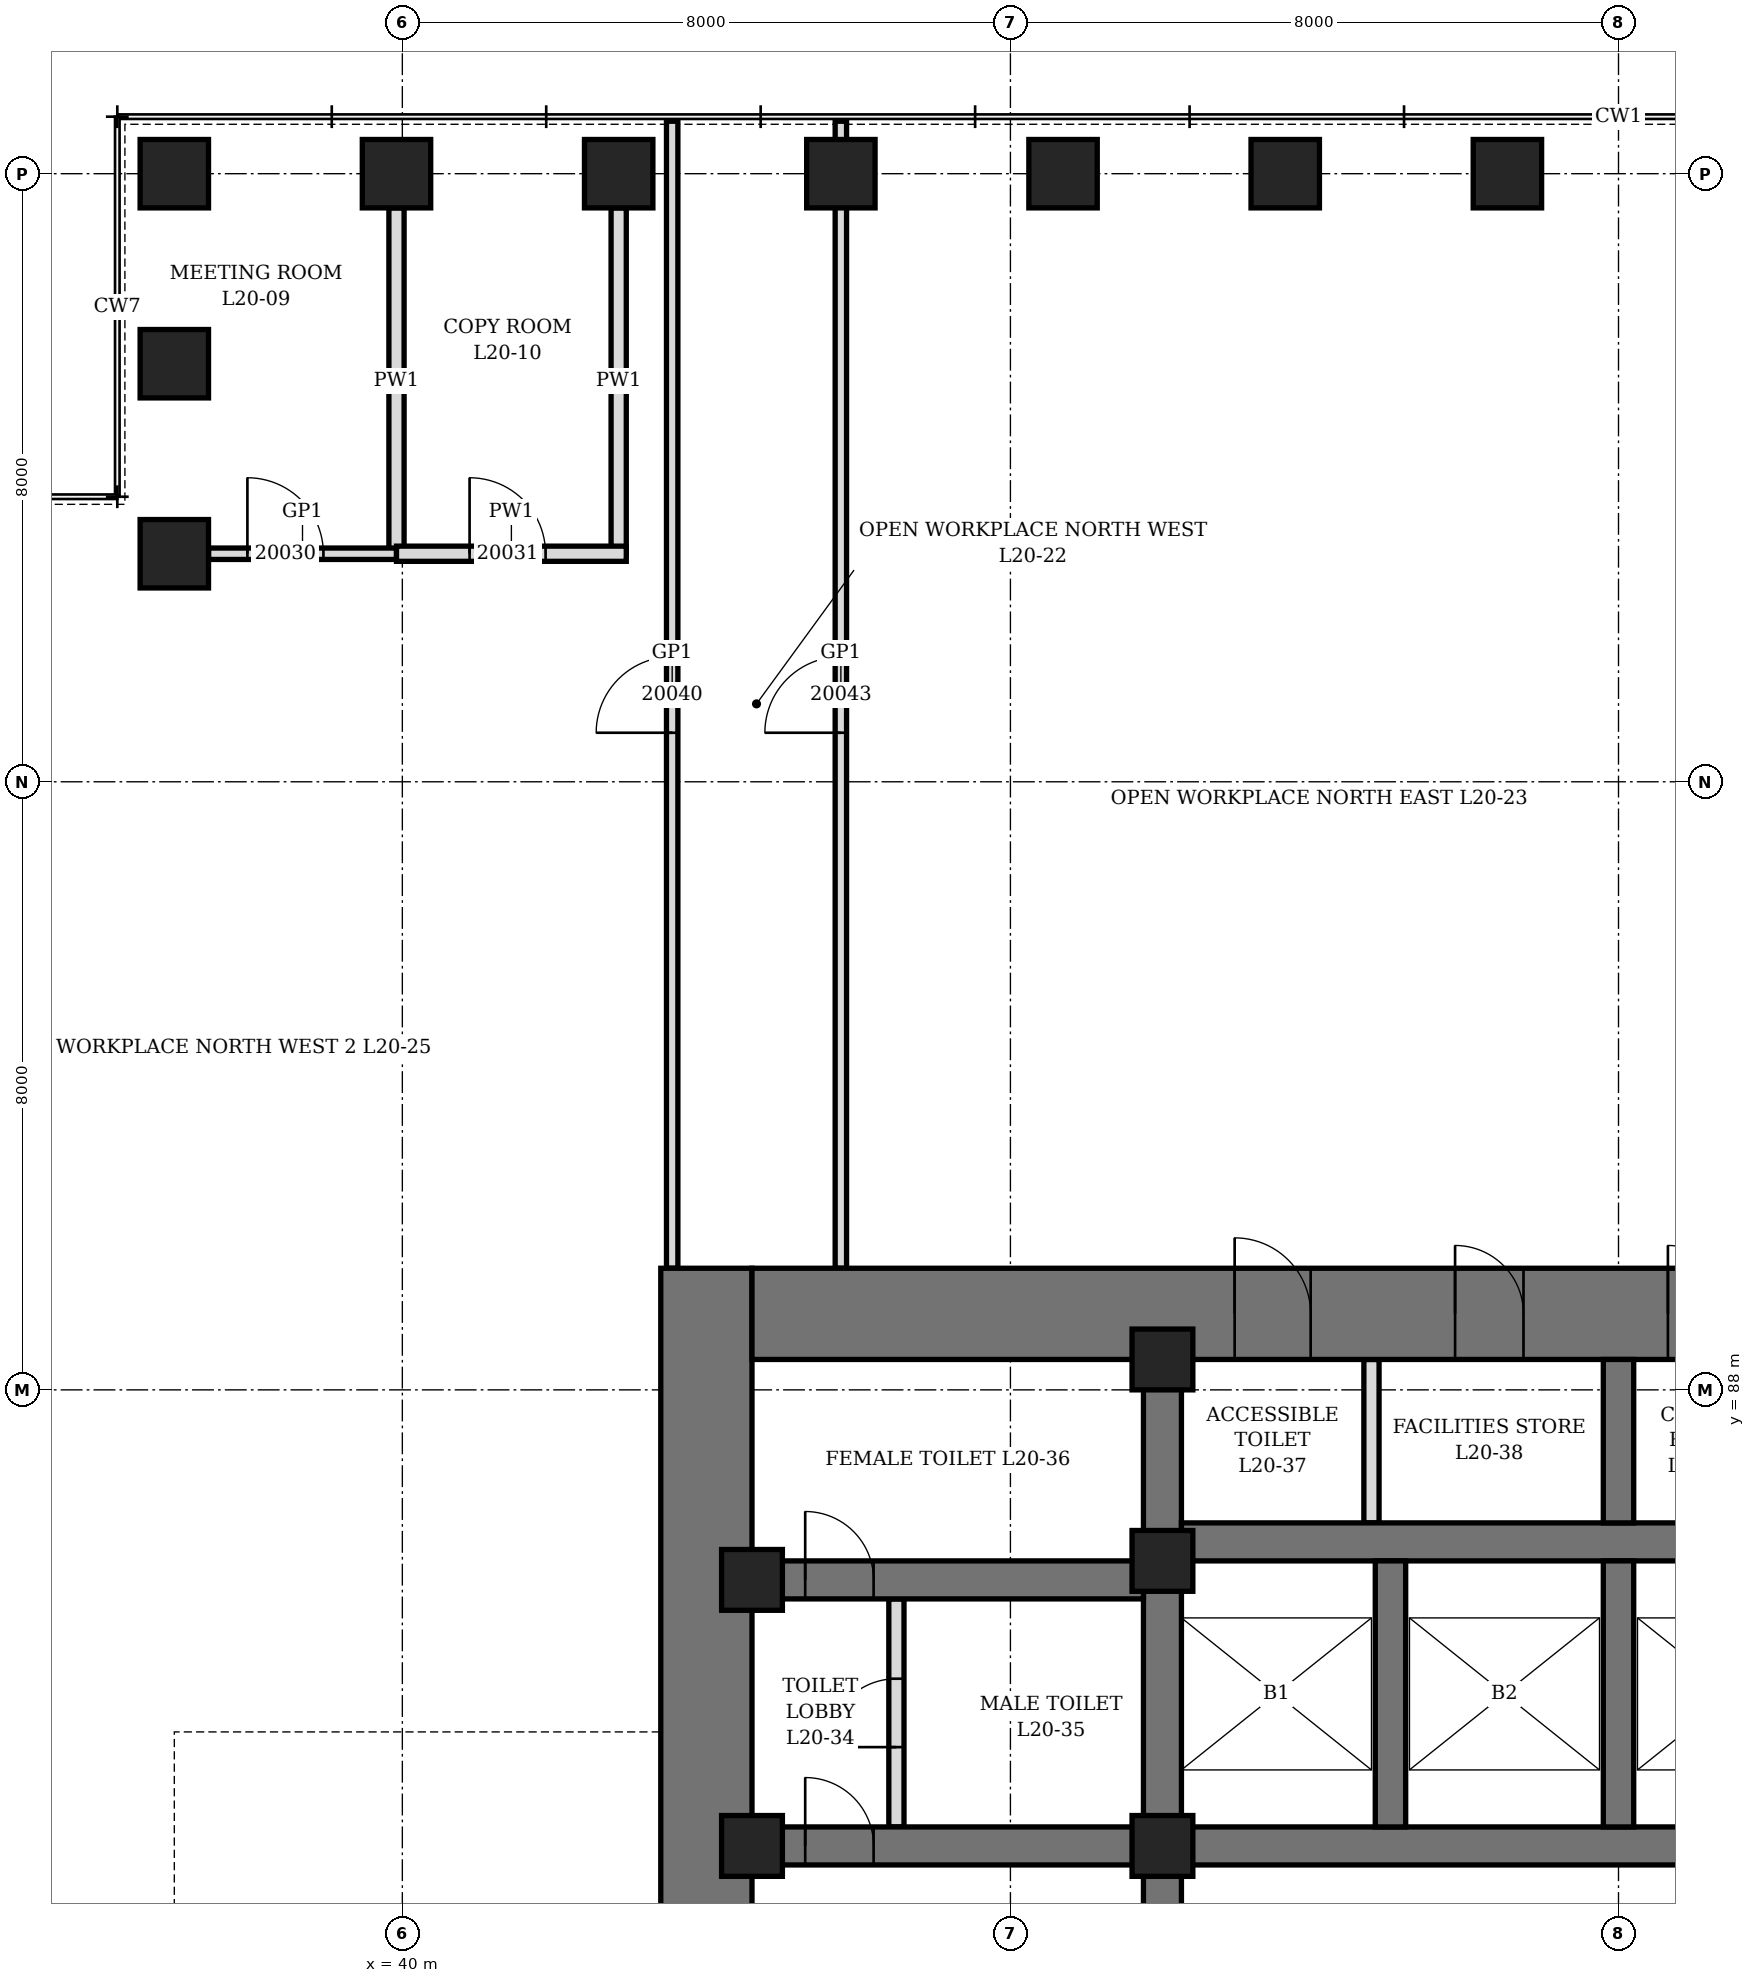
"""IFC4 building model, lengths in metres.
Left out: names, types, materials, properties, quantities, classifications, styles, units other than length and angle.
Written with IfcOpenShell. Run it as: python <this file> out.ifc"""

import sys

from ifc_helpers import new_model, si_unit, direction, frame, frame_2d, origin, origin_2d, place, context, subcontext, project, spatial, rectangle, hollow_rectangle, extrude, element, fill, save


model = new_model("IFC4")
c1 = context("Model", 3, precision=1e-05, world=origin(), true_north=direction((0.0, 1.0)))
c2 = subcontext(c1, "Body", "Model", "MODEL_VIEW")
j1 = project(units=[si_unit("LENGTHUNIT", "METRE"), si_unit("PLANEANGLEUNIT", "RADIAN")], contexts=[c1])
p1 = place(None, origin())
s1 = spatial("IfcSite", under=j1, at=p1, CompositionType="ELEMENT")
p2 = place(p1, origin())
s2 = spatial("IfcBuilding", under=s1, at=p2, CompositionType="ELEMENT")
p3 = place(p2, frame((0.0, 0.0, 93.7)))
s3 = spatial("IfcBuildingStorey", under=s2, at=p3, CompositionType="ELEMENT", Elevation=93.7)
for number, where, z_axis, x_axis in (
    (1, (54.539, 104.0, 0.0), (0.0, 0.0, 1.0), (1.0, 0.0, 0.0)),
    (2, (51.615, 104.0, 0.0), (0.0, 0.0, 1.0), (1.0, 0.0, 0.0)),
    (3, (48.692, 104.0, 0.0), (0.0, 0.0, 1.0), (1.0, 0.0, 0.0)),
    (4, (45.769, 104.0, 0.0), (0.0, 0.0, 1.0), (1.0, 0.0, 0.0)),
    (5, (42.846, 104.0, 0.0), (0.0, 0.0, 1.0), (1.0, 0.0, 0.0)),
    (6, (39.923, 104.0, 0.0), (0.0, 0.0, 1.0), (1.0, 0.0, 0.0)),
    (7, (37.0, 104.0, 0.0), (0.0, 0.0, 1.0), (0.0, 1.0, 0.0)),
    (8, (37.0, 101.5, 0.0), (0.0, 0.0, 1.0), (0.0, 1.0, 0.0)),
    (9, (37.0, 99.0, 0.0), (0.0, 0.0, 1.0), (1.0, 0.0, 0.0)),
):
    element("IfcColumn", number, at=place(p3, frame(where, z_axis=z_axis, x_axis=x_axis)), inside=s3, PredefinedType="COLUMN", context=c2, shape_type="SweptSolid", body=[
        extrude(hollow_rectangle(XDim=0.9, YDim=0.9, WallThickness=0.12, at=origin_2d()), origin(), (0.0, 0.0, 1.0), 4.2),
    ])
p4 = place(p3, frame((44.0, 70.4, 0.0), z_axis=(0.0, 0.0, 1.0), x_axis=(0.0, 1.0, 0.0)))
e10 = element("IfcWall", 10, at=p4, inside=s3, PredefinedType="SHEAR", context=c2, shape_type="SweptSolid", body=[
    extrude(rectangle(XDim=19.2, YDim=1.2, at=frame_2d((9.6, 0.0))), origin(), (0.0, 0.0, 1.0), 4.2),
])
p5 = place(p4, frame((8.6, 0.0, 0.0)))
e11 = element("IfcOpeningElement", 11, at=p5, cuts=e10, PredefinedType="OPENING", context=c2, shape_type="SweptSolid", body=[
    extrude(rectangle(XDim=2.0, YDim=2.4, at=frame_2d((1.0, 1.2))), frame((0.0, 0.61, 0.0), z_axis=(0.0, -1.0, 0.0), x_axis=(1.0, 0.0, 0.0)), (0.0, 0.0, 1.0), 1.22),
])
p6 = place(p3, frame((44.6, 89.0, 0.0), z_axis=(0.0, 0.0, 1.0), x_axis=(1.0, 0.0, 0.0)))
e12 = element("IfcWall", 12, at=p6, inside=s3, PredefinedType="SHEAR", context=c2, shape_type="SweptSolid", body=[
    extrude(rectangle(XDim=22.8, YDim=1.2, at=frame_2d((11.4, 0.0))), origin(), (0.0, 0.0, 1.0), 4.2),
])
p7 = place(p6, frame((6.35, 0.0, 0.0)))
e13 = element("IfcOpeningElement", 13, at=p7, cuts=e12, PredefinedType="OPENING", context=c2, shape_type="SweptSolid", body=[
    extrude(rectangle(XDim=1.0, YDim=2.1, at=frame_2d((0.5, 1.05))), frame((0.0, 0.61, 0.0), z_axis=(0.0, -1.0, 0.0), x_axis=(1.0, 0.0, 0.0)), (0.0, 0.0, 1.0), 1.22),
])
p8 = place(p6, frame((9.25, 0.0, 0.0)))
e14 = element("IfcOpeningElement", 14, at=p8, cuts=e12, PredefinedType="OPENING", context=c2, shape_type="SweptSolid", body=[
    extrude(rectangle(XDim=0.9, YDim=2.1, at=frame_2d((0.45, 1.05))), frame((0.0, 0.61, 0.0), z_axis=(0.0, -1.0, 0.0), x_axis=(1.0, 0.0, 0.0)), (0.0, 0.0, 1.0), 1.22),
])
p9 = place(p6, frame((12.05, 0.0, 0.0)))
e15 = element("IfcOpeningElement", 15, at=p9, cuts=e12, PredefinedType="OPENING", context=c2, shape_type="SweptSolid", body=[
    extrude(rectangle(XDim=0.9, YDim=2.1, at=frame_2d((0.45, 1.05))), frame((0.0, 0.61, 0.0), z_axis=(0.0, -1.0, 0.0), x_axis=(1.0, 0.0, 0.0)), (0.0, 0.0, 1.0), 1.22),
])
p10 = place(p6, frame((13.975, 0.0, 0.0)))
e16 = element("IfcOpeningElement", 16, at=p10, cuts=e12, PredefinedType="OPENING", context=c2, shape_type="SweptSolid", body=[
    extrude(rectangle(XDim=0.9, YDim=2.1, at=frame_2d((0.45, 1.05))), frame((0.0, 0.61, 0.0), z_axis=(0.0, -1.0, 0.0), x_axis=(1.0, 0.0, 0.0)), (0.0, 0.0, 1.0), 1.22),
])
p11 = place(p3, frame((50.0, 71.6, 0.0), z_axis=(0.0, 0.0, 1.0), x_axis=(0.0, 1.0, 0.0)))
e17 = element("IfcWall", 17, at=p11, inside=s3, PredefinedType="SHEAR", context=c2, shape_type="SweptSolid", body=[
    extrude(rectangle(XDim=16.8, YDim=0.5, at=frame_2d((8.4, 0.0))), origin(), (0.0, 0.0, 1.0), 4.2),
])
p12 = place(p11, frame((7.5, 0.0, 0.0)))
e18 = element("IfcOpeningElement", 18, at=p12, cuts=e17, PredefinedType="OPENING", context=c2, shape_type="SweptSolid", body=[
    extrude(rectangle(XDim=1.8, YDim=2.4, at=frame_2d((0.9, 1.2))), frame((0.0, 0.26, 0.0), z_axis=(0.0, -1.0, 0.0), x_axis=(1.0, 0.0, 0.0)), (0.0, 0.0, 1.0), 0.52),
])
p13 = place(p3, frame((44.6, 82.0, 0.0), z_axis=(0.0, 0.0, 1.0), x_axis=(1.0, 0.0, 0.0)))
e19 = element("IfcWall", 19, at=p13, inside=s3, PredefinedType="SHEAR", context=c2, shape_type="SweptSolid", body=[
    extrude(rectangle(XDim=5.15, YDim=0.5, at=frame_2d((2.575, 0.0))), origin(), (0.0, 0.0, 1.0), 4.2),
])
p14 = place(p13, frame((0.7, 0.0, 0.0)))
e20 = element("IfcOpeningElement", 20, at=p14, cuts=e19, PredefinedType="OPENING", context=c2, shape_type="SweptSolid", body=[
    extrude(rectangle(XDim=0.9, YDim=2.1, at=frame_2d((0.45, 1.05))), frame((0.0, 0.26, 0.0), z_axis=(0.0, -1.0, 0.0), x_axis=(1.0, 0.0, 0.0)), (0.0, 0.0, 1.0), 0.52),
])
p15 = place(p3, frame((44.6, 85.5, 0.0), z_axis=(0.0, 0.0, 1.0), x_axis=(1.0, 0.0, 0.0)))
e21 = element("IfcWall", 21, at=p15, inside=s3, PredefinedType="SHEAR", context=c2, shape_type="SweptSolid", body=[
    extrude(rectangle(XDim=5.15, YDim=0.5, at=frame_2d((2.575, 0.0))), origin(), (0.0, 0.0, 1.0), 4.2),
])
p16 = place(p15, frame((0.7, 0.0, 0.0)))
e22 = element("IfcOpeningElement", 22, at=p16, cuts=e21, PredefinedType="OPENING", context=c2, shape_type="SweptSolid", body=[
    extrude(rectangle(XDim=0.9, YDim=2.1, at=frame_2d((0.45, 1.05))), frame((0.0, 0.26, 0.0), z_axis=(0.0, -1.0, 0.0), x_axis=(1.0, 0.0, 0.0)), (0.0, 0.0, 1.0), 0.52),
])
for number, where, z_axis, x_axis in (
    (23, (50.25, 82.0, 0.0), (0.0, 0.0, 1.0), (1.0, 0.0, 0.0)),
    (24, (50.25, 86.0, 0.0), (0.0, 0.0, 1.0), (1.0, 0.0, 0.0)),
):
    element("IfcWall", number, at=place(p3, frame(where, z_axis=z_axis, x_axis=x_axis)), inside=s3, PredefinedType="SHEAR", context=c2, shape_type="SweptSolid", body=[
        extrude(rectangle(XDim=11.5, YDim=0.5, at=frame_2d((5.75, 0.0))), origin(), (0.0, 0.0, 1.0), 4.2),
    ])
for number, where, z_axis, x_axis in (
    (25, (53.0, 82.25, 0.0), (0.0, 0.0, 1.0), (0.0, 1.0, 0.0)),
    (26, (56.0, 82.25, 0.0), (0.0, 0.0, 1.0), (0.0, 1.0, 0.0)),
):
    element("IfcWall", number, at=place(p3, frame(where, z_axis=z_axis, x_axis=x_axis)), inside=s3, PredefinedType="SHEAR", context=c2, shape_type="SweptSolid", body=[
        extrude(rectangle(XDim=3.5, YDim=0.4, at=frame_2d((1.75, 0.0))), origin(), (0.0, 0.0, 1.0), 4.2),
    ])
p17 = place(p3, frame((56.0, 86.25, 0.0), z_axis=(0.0, 0.0, 1.0), x_axis=(0.0, 1.0, 0.0)))
e27 = element("IfcWall", 27, at=p17, inside=s3, PredefinedType="SHEAR", context=c2, shape_type="SweptSolid", body=[
    extrude(rectangle(XDim=2.15, YDim=0.4, at=frame_2d((1.075, 0.0))), origin(), (0.0, 0.0, 1.0), 4.2),
])
for number, where, z_axis, x_axis in (
    (28, (44.6, 82.0, 0.0), (0.0, 0.0, 1.0), (1.0, 0.0, 0.0)),
    (29, (44.6, 85.5, 0.0), (0.0, 0.0, 1.0), (1.0, 0.0, 0.0)),
    (30, (50.0, 82.0, 0.0), (0.0, 0.0, 1.0), (1.0, 0.0, 0.0)),
    (31, (50.0, 85.75, 0.0), (0.0, 0.0, 1.0), (1.0, 0.0, 0.0)),
    (32, (50.0, 88.4, 0.0), (0.0, 0.0, 1.0), (1.0, 0.0, 0.0)),
):
    element("IfcColumn", number, at=place(p3, frame(where, z_axis=z_axis, x_axis=x_axis)), inside=s3, PredefinedType="COLUMN", context=c2, shape_type="SweptSolid", body=[
        extrude(hollow_rectangle(XDim=0.8, YDim=0.8, WallThickness=0.1, at=origin_2d()), origin(), (0.0, 0.0, 1.0), 4.2),
    ])
p18 = place(p3, frame((46.5, 82.25, 0.0), z_axis=(0.0, 0.0, 1.0), x_axis=(0.0, 1.0, 0.0)))
e33 = element("IfcWall", 33, at=p18, inside=s3, PredefinedType="PARTITIONING", context=c2, shape_type="SweptSolid", body=[
    extrude(rectangle(XDim=3.0, YDim=0.2, at=frame_2d((1.5, 0.0))), origin(), (0.0, 0.0, 1.0), 4.04),
])
p19 = place(p18, frame((1.05, 0.0, 0.0)))
e34 = element("IfcOpeningElement", 34, at=p19, cuts=e33, PredefinedType="OPENING", context=c2, shape_type="SweptSolid", body=[
    extrude(rectangle(XDim=0.9, YDim=2.1, at=frame_2d((0.45, 1.05))), frame((0.0, 0.11, 0.0), z_axis=(0.0, -1.0, 0.0), x_axis=(1.0, 0.0, 0.0)), (0.0, 0.0, 1.0), 0.22),
])
p20 = place(p3, frame((52.75, 86.25, 0.0), z_axis=(0.0, 0.0, 1.0), x_axis=(0.0, 1.0, 0.0)))
e35 = element("IfcWall", 35, at=p20, inside=s3, PredefinedType="PARTITIONING", context=c2, shape_type="SweptSolid", body=[
    extrude(rectangle(XDim=2.15, YDim=0.2, at=frame_2d((1.075, 0.0))), origin(), (0.0, 0.0, 1.0), 4.04),
])
p21 = place(p3, frame((39.923, 99.0, 0.0), z_axis=(0.0, 0.0, 1.0), x_axis=(0.0, 1.0, 0.0)))
e36 = element("IfcWall", 36, at=p21, inside=s3, PredefinedType="PARTITIONING", context=c2, shape_type="SweptSolid", body=[
    extrude(rectangle(XDim=4.55, YDim=0.2, at=frame_2d((2.275, 0.0))), origin(), (0.0, 0.0, 1.0), 3.428),
])
p22 = place(p3, frame((42.846, 99.0, 0.0), z_axis=(0.0, 0.0, 1.0), x_axis=(0.0, 1.0, 0.0)))
e37 = element("IfcWall", 37, at=p22, inside=s3, PredefinedType="PARTITIONING", context=c2, shape_type="SweptSolid", body=[
    extrude(rectangle(XDim=4.55, YDim=0.2, at=frame_2d((2.275, 0.0))), origin(), (0.0, 0.0, 1.0), 3.278),
])
p23 = place(p3, frame((37.45, 99.0, 0.0), z_axis=(0.0, 0.0, 1.0), x_axis=(1.0, 0.0, 0.0)))
e38 = element("IfcWall", 38, at=p23, inside=s3, PredefinedType="PARTITIONING", context=c2, shape_type="SweptSolid", body=[
    extrude(rectangle(XDim=2.473, YDim=0.15, at=frame_2d((1.237, 0.0))), origin(), (0.0, 0.0, 1.0), 4.04),
])
p24 = place(p23, frame((0.511, 0.0, 0.0)))
e39 = element("IfcOpeningElement", 39, at=p24, cuts=e38, PredefinedType="OPENING", context=c2, shape_type="SweptSolid", body=[
    extrude(rectangle(XDim=1.0, YDim=2.4, at=frame_2d((0.5, 1.2))), frame((0.0, 0.085, 0.0), z_axis=(0.0, -1.0, 0.0), x_axis=(1.0, 0.0, 0.0)), (0.0, 0.0, 1.0), 0.17),
])
p25 = place(p3, frame((39.923, 99.0, 0.0), z_axis=(0.0, 0.0, 1.0), x_axis=(1.0, 0.0, 0.0)))
e40 = element("IfcWall", 40, at=p25, inside=s3, PredefinedType="PARTITIONING", context=c2, shape_type="SweptSolid", body=[
    extrude(rectangle(XDim=3.023, YDim=0.2, at=frame_2d((1.511, 0.0))), origin(), (0.0, 0.0, 1.0), 4.04),
])
p26 = place(p25, frame((0.961, 0.0, 0.0)))
e41 = element("IfcOpeningElement", 41, at=p26, cuts=e40, PredefinedType="OPENING", context=c2, shape_type="SweptSolid", body=[
    extrude(rectangle(XDim=1.0, YDim=2.1, at=frame_2d((0.5, 1.05))), frame((0.0, 0.11, 0.0), z_axis=(0.0, -1.0, 0.0), x_axis=(1.0, 0.0, 0.0)), (0.0, 0.0, 1.0), 0.22),
])
p27 = place(p3, frame((43.55, 89.6, 0.0), z_axis=(0.0, 0.0, 1.0), x_axis=(0.0, 1.0, 0.0)))
e42 = element("IfcWall", 42, at=p27, inside=s3, PredefinedType="PARTITIONING", context=c2, shape_type="SweptSolid", body=[
    extrude(rectangle(XDim=15.09, YDim=0.15, at=frame_2d((7.545, 0.0))), origin(), (0.0, 0.0, 1.0), 4.04),
])
p28 = place(p27, frame((7.045, 0.0, 0.0)))
e43 = element("IfcOpeningElement", 43, at=p28, cuts=e42, PredefinedType="OPENING", context=c2, shape_type="SweptSolid", body=[
    extrude(rectangle(XDim=1.0, YDim=2.4, at=frame_2d((0.5, 1.2))), frame((0.0, 0.085, 0.0), z_axis=(0.0, -1.0, 0.0), x_axis=(1.0, 0.0, 0.0)), (0.0, 0.0, 1.0), 0.17),
])
p29 = place(p3, frame((45.769, 89.6, 0.0), z_axis=(0.0, 0.0, 1.0), x_axis=(0.0, 1.0, 0.0)))
e44 = element("IfcWall", 44, at=p29, inside=s3, PredefinedType="PARTITIONING", context=c2, shape_type="SweptSolid", body=[
    extrude(rectangle(XDim=15.09, YDim=0.15, at=frame_2d((7.545, 0.0))), origin(), (0.0, 0.0, 1.0), 3.278),
])
p30 = place(p29, frame((7.045, 0.0, 0.0)))
e45 = element("IfcOpeningElement", 45, at=p30, cuts=e44, PredefinedType="OPENING", context=c2, shape_type="SweptSolid", body=[
    extrude(rectangle(XDim=1.0, YDim=2.4, at=frame_2d((0.5, 1.2))), frame((0.0, 0.085, 0.0), z_axis=(0.0, -1.0, 0.0), x_axis=(1.0, 0.0, 0.0)), (0.0, 0.0, 1.0), 0.17),
])
p31 = place(p14, origin())
e46 = element("IfcDoor", 46, at=p31, inside=s3, OperationType="SINGLE_SWING_LEFT", PredefinedType="DOOR", context=c2, shape_type="SweptSolid", body=[
    extrude(rectangle(XDim=0.9, YDim=2.1, at=frame_2d((0.45, 1.05))), frame((0.0, 0.25, 0.0), z_axis=(0.0, -1.0, 0.0), x_axis=(1.0, 0.0, 0.0)), (0.0, 0.0, 1.0), 0.5),
])
fill(e20, e46)
p32 = place(p19, origin())
e47 = element("IfcDoor", 47, at=p32, inside=s3, OperationType="SINGLE_SWING_RIGHT", PredefinedType="DOOR", context=c2, shape_type="SweptSolid", body=[
    extrude(rectangle(XDim=0.9, YDim=2.1, at=frame_2d((0.45, 1.05))), frame((0.0, 0.1, 0.0), z_axis=(0.0, -1.0, 0.0), x_axis=(1.0, 0.0, 0.0)), (0.0, 0.0, 1.0), 0.199),
])
fill(e34, e47)
p33 = place(p16, origin())
e48 = element("IfcDoor", 48, at=p33, inside=s3, OperationType="SINGLE_SWING_RIGHT", PredefinedType="DOOR", context=c2, shape_type="SweptSolid", body=[
    extrude(rectangle(XDim=0.9, YDim=2.1, at=frame_2d((0.45, 1.05))), frame((0.0, 0.25, 0.0), z_axis=(0.0, -1.0, 0.0), x_axis=(1.0, 0.0, 0.0)), (0.0, 0.0, 1.0), 0.5),
])
fill(e22, e48)
p34 = place(p7, origin())
e49 = element("IfcDoor", 49, at=p34, inside=s3, OperationType="SINGLE_SWING_LEFT", PredefinedType="DOOR", context=c2, shape_type="SweptSolid", body=[
    extrude(rectangle(XDim=1.0, YDim=2.1, at=frame_2d((0.5, 1.05))), frame((0.0, 0.35, 0.0), z_axis=(0.0, -1.0, 0.0), x_axis=(1.0, 0.0, 0.0)), (0.0, 0.0, 1.0), 0.7),
])
fill(e13, e49)
p35 = place(p8, origin())
e50 = element("IfcDoor", 50, at=p35, inside=s3, OperationType="SINGLE_SWING_LEFT", PredefinedType="DOOR", context=c2, shape_type="SweptSolid", body=[
    extrude(rectangle(XDim=0.9, YDim=2.1, at=frame_2d((0.45, 1.05))), frame((0.0, 0.35, 0.0), z_axis=(0.0, -1.0, 0.0), x_axis=(1.0, 0.0, 0.0)), (0.0, 0.0, 1.0), 0.7),
])
fill(e14, e50)
p36 = place(p9, origin())
e51 = element("IfcDoor", 51, at=p36, inside=s3, OperationType="SINGLE_SWING_LEFT", PredefinedType="DOOR", context=c2, shape_type="SweptSolid", body=[
    extrude(rectangle(XDim=0.9, YDim=2.1, at=frame_2d((0.45, 1.05))), frame((0.0, 0.35, 0.0), z_axis=(0.0, -1.0, 0.0), x_axis=(1.0, 0.0, 0.0)), (0.0, 0.0, 1.0), 0.7),
])
fill(e15, e51)
p37 = place(p24, origin())
e52 = element("IfcDoor", 52, at=p37, inside=s3, OperationType="SINGLE_SWING_RIGHT", PredefinedType="DOOR", context=c2, shape_type="SweptSolid", body=[
    extrude(rectangle(XDim=1.0, YDim=2.4, at=frame_2d((0.5, 1.2))), frame((0.0, 0.075, 0.0), z_axis=(0.0, -1.0, 0.0), x_axis=(1.0, 0.0, 0.0)), (0.0, 0.0, 1.0), 0.149),
])
fill(e39, e52)
p38 = place(p26, origin())
e53 = element("IfcDoor", 53, at=p38, inside=s3, OperationType="SINGLE_SWING_LEFT", PredefinedType="DOOR", context=c2, shape_type="SweptSolid", body=[
    extrude(rectangle(XDim=1.0, YDim=2.1, at=frame_2d((0.5, 1.05))), frame((0.0, 0.1, 0.0), z_axis=(0.0, -1.0, 0.0), x_axis=(1.0, 0.0, 0.0)), (0.0, 0.0, 1.0), 0.199),
])
fill(e41, e53)
p39 = place(p28, origin())
e54 = element("IfcDoor", 54, at=p39, inside=s3, OperationType="SINGLE_SWING_RIGHT", PredefinedType="DOOR", context=c2, shape_type="SweptSolid", body=[
    extrude(rectangle(XDim=1.0, YDim=2.4, at=frame_2d((0.5, 1.2))), frame((0.0, 0.075, 0.0), z_axis=(0.0, -1.0, 0.0), x_axis=(1.0, 0.0, 0.0)), (0.0, 0.0, 1.0), 0.149),
])
fill(e43, e54)
p40 = place(p30, origin())
e55 = element("IfcDoor", 55, at=p40, inside=s3, OperationType="SINGLE_SWING_RIGHT", PredefinedType="DOOR", context=c2, shape_type="SweptSolid", body=[
    extrude(rectangle(XDim=1.0, YDim=2.4, at=frame_2d((0.5, 1.2))), frame((0.0, 0.075, 0.0), z_axis=(0.0, -1.0, 0.0), x_axis=(1.0, 0.0, 0.0)), (0.0, 0.0, 1.0), 0.149),
])
fill(e45, e55)
save(model, sys.argv[1])
